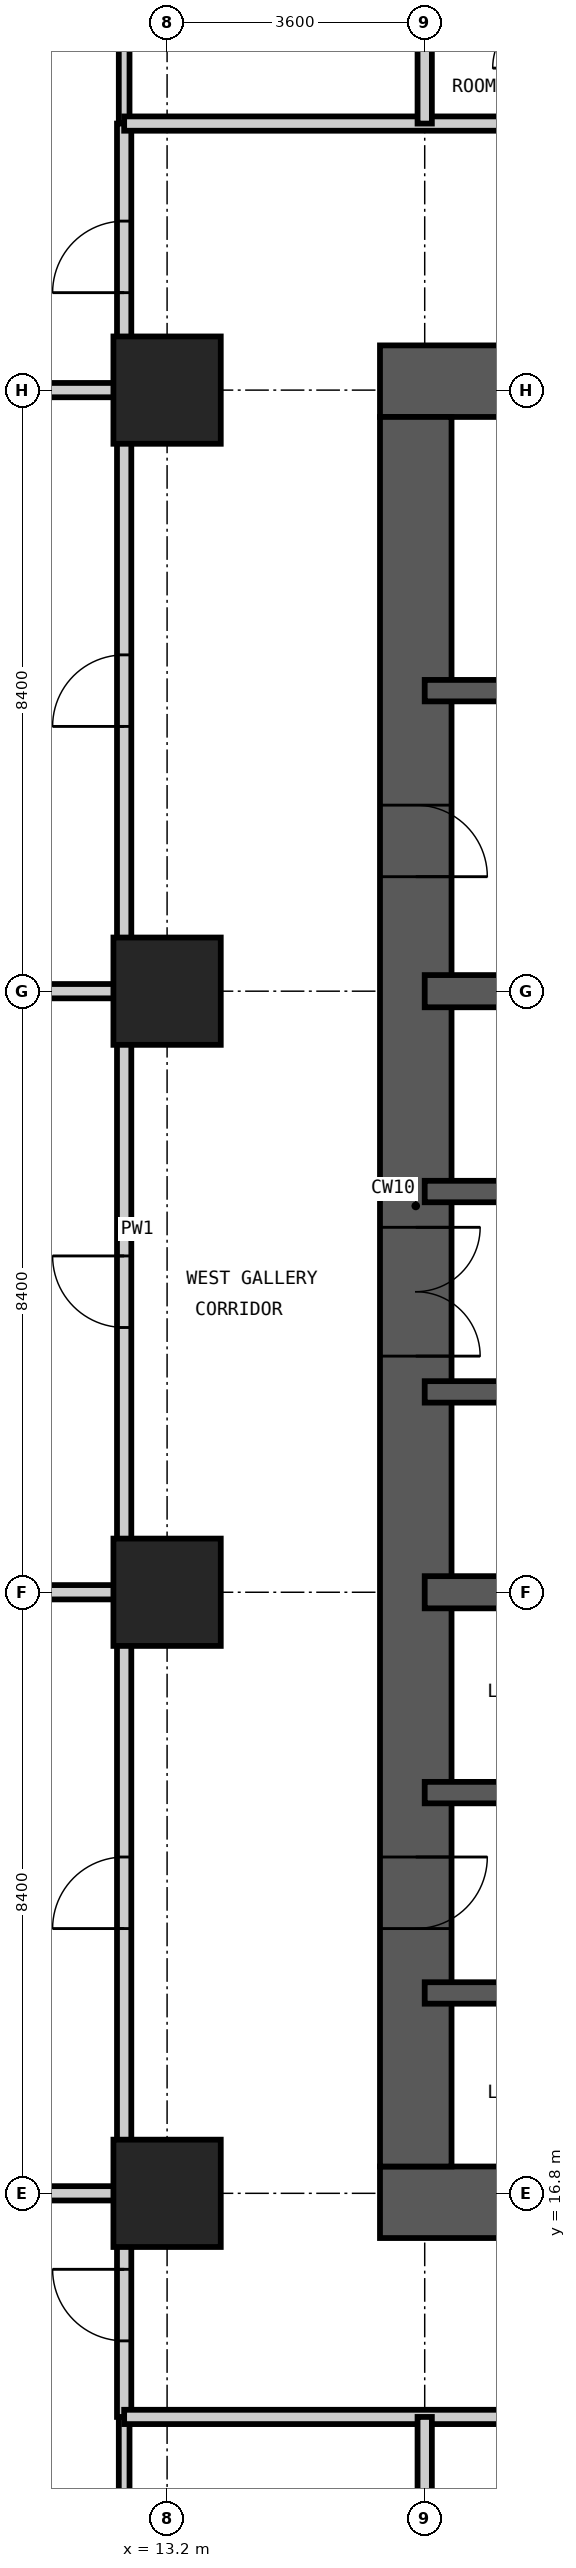
"""IFC4 building model, lengths in metres.
Left out: names, types, materials, properties, quantities, classifications, styles, units other than length and angle.
Written with IfcOpenShell. Run it as: python <this file> out.ifc"""

import sys

from ifc_helpers import new_model, si_unit, direction, frame, frame_2d, origin, origin_2d, place, context, subcontext, project, spatial, rectangle, extrude, element, fill, save


model = new_model("IFC4")
c1 = context("Model", 3, precision=1e-05, world=origin(), true_north=direction((0.0, 1.0)))
c2 = subcontext(c1, "Body", "Model", "MODEL_VIEW")
j1 = project(units=[si_unit("LENGTHUNIT", "METRE"), si_unit("PLANEANGLEUNIT", "RADIAN")], contexts=[c1])
p1 = place(None, origin())
s1 = spatial("IfcSite", under=j1, at=p1, CompositionType="ELEMENT")
p2 = place(p1, origin())
s2 = spatial("IfcBuilding", under=s1, at=p2, CompositionType="ELEMENT")
p3 = place(p2, frame((0.0, 0.0, 122.4)))
s3 = spatial("IfcBuildingStorey", under=s2, at=p3, CompositionType="ELEMENT", Elevation=122.4)
for number, where, z_axis, x_axis in (
    (1, (13.2, 16.8, -0.35), (0.0, 0.0, 1.0), (1.0, 0.0, 0.0)),
    (2, (13.2, 25.2, -0.35), (0.0, 0.0, 1.0), (1.0, 0.0, 0.0)),
    (3, (13.2, 33.6, -0.35), (0.0, 0.0, 1.0), (1.0, 0.0, 0.0)),
    (4, (13.2, 42.0, -0.35), (0.0, 0.0, 1.0), (1.0, 0.0, 0.0)),
):
    element("IfcColumn", number, at=place(p3, frame(where, z_axis=z_axis, x_axis=x_axis)), inside=s3, PredefinedType="COLUMN", context=c2, shape_type="SweptSolid", body=[
        extrude(rectangle(XDim=1.5, YDim=1.5, at=origin_2d()), origin(), (0.0, 0.0, 1.0), 3.6),
    ])
p4 = place(p3, frame((16.175, 16.675, -0.35), z_axis=(0.0, 0.0, 1.0), x_axis=(1.0, 0.0, 0.0)))
e5 = element("IfcWall", 5, at=p4, inside=s3, PredefinedType="SHEAR", context=c2, shape_type="SweptSolid", body=[
    extrude(rectangle(XDim=26.45, YDim=1.0, at=frame_2d((13.225, 0.0))), origin(), (0.0, 0.0, 1.0), 3.6),
])
p5 = place(p4, frame((12.725, 0.0, 0.35)))
e6 = element("IfcOpeningElement", 6, at=p5, cuts=e5, PredefinedType="OPENING", context=c2, shape_type="SweptSolid", body=[
    extrude(rectangle(XDim=1.0, YDim=2.1, at=frame_2d((0.5, 1.05))), frame((0.0, 0.51, 0.0), z_axis=(0.0, -1.0, 0.0), x_axis=(1.0, 0.0, 0.0)), (0.0, 0.0, 1.0), 1.02),
])
p6 = place(p4, frame((19.025, 0.0, 0.35)))
e7 = element("IfcOpeningElement", 7, at=p6, cuts=e5, PredefinedType="OPENING", context=c2, shape_type="SweptSolid", body=[
    extrude(rectangle(XDim=1.0, YDim=2.1, at=frame_2d((0.5, 1.05))), frame((0.0, 0.51, 0.0), z_axis=(0.0, -1.0, 0.0), x_axis=(1.0, 0.0, 0.0)), (0.0, 0.0, 1.0), 1.02),
])
p7 = place(p3, frame((42.625, 42.125, -0.35), z_axis=(0.0, 0.0, 1.0), x_axis=(-1.0, 0.0, 0.0)))
e8 = element("IfcWall", 8, at=p7, inside=s3, PredefinedType="SHEAR", context=c2, shape_type="SweptSolid", body=[
    extrude(rectangle(XDim=26.45, YDim=1.0, at=frame_2d((13.225, 0.0))), origin(), (0.0, 0.0, 1.0), 3.6),
])
p8 = place(p7, frame((21.125, 0.0, 0.35)))
e9 = element("IfcOpeningElement", 9, at=p8, cuts=e8, PredefinedType="OPENING", context=c2, shape_type="SweptSolid", body=[
    extrude(rectangle(XDim=1.0, YDim=2.1, at=frame_2d((0.5, 1.05))), frame((0.0, 0.51, 0.0), z_axis=(0.0, -1.0, 0.0), x_axis=(1.0, 0.0, 0.0)), (0.0, 0.0, 1.0), 1.02),
])
p9 = place(p7, frame((10.525, 0.0, 0.35)))
e10 = element("IfcOpeningElement", 10, at=p9, cuts=e8, PredefinedType="OPENING", context=c2, shape_type="SweptSolid", body=[
    extrude(rectangle(XDim=1.2, YDim=2.2, at=frame_2d((0.6, 1.1))), frame((0.0, 0.51, 0.0), z_axis=(0.0, -1.0, 0.0), x_axis=(1.0, 0.0, 0.0)), (0.0, 0.0, 1.0), 1.02),
])
p10 = place(p3, frame((16.675, 41.625, -0.35), z_axis=(0.0, 0.0, 1.0), x_axis=(0.0, -1.0, 0.0)))
e11 = element("IfcWall", 11, at=p10, inside=s3, PredefinedType="SHEAR", context=c2, shape_type="SweptSolid", body=[
    extrude(rectangle(XDim=24.45, YDim=1.0, at=frame_2d((12.225, 0.0))), origin(), (0.0, 0.0, 1.0), 3.6),
])
p11 = place(p10, frame((11.325, 0.0, 0.35)))
e12 = element("IfcOpeningElement", 12, at=p11, cuts=e11, PredefinedType="OPENING", context=c2, shape_type="SweptSolid", body=[
    extrude(rectangle(XDim=1.8, YDim=2.2, at=frame_2d((0.9, 1.1))), frame((0.0, 0.51, 0.0), z_axis=(0.0, -1.0, 0.0), x_axis=(1.0, 0.0, 0.0)), (0.0, 0.0, 1.0), 1.02),
])
p12 = place(p10, frame((20.125, 0.0, 0.35)))
e13 = element("IfcOpeningElement", 13, at=p12, cuts=e11, PredefinedType="OPENING", context=c2, shape_type="SweptSolid", body=[
    extrude(rectangle(XDim=1.0, YDim=2.1, at=frame_2d((0.5, 1.05))), frame((0.0, 0.51, 0.0), z_axis=(0.0, -1.0, 0.0), x_axis=(1.0, 0.0, 0.0)), (0.0, 0.0, 1.0), 1.02),
])
p13 = place(p10, frame((5.425, 0.0, 0.35)))
e14 = element("IfcOpeningElement", 14, at=p13, cuts=e11, PredefinedType="OPENING", context=c2, shape_type="SweptSolid", body=[
    extrude(rectangle(XDim=1.0, YDim=2.1, at=frame_2d((0.5, 1.05))), frame((0.0, 0.51, 0.0), z_axis=(0.0, -1.0, 0.0), x_axis=(1.0, 0.0, 0.0)), (0.0, 0.0, 1.0), 1.02),
])
for number, where, z_axis, x_axis in (
    (15, (16.8, 19.6, -0.35), (0.0, 0.0, 1.0), (1.0, 0.0, 0.0)),
    (16, (16.8, 22.4, -0.35), (0.0, 0.0, 1.0), (1.0, 0.0, 0.0)),
):
    element("IfcWall", number, at=place(p3, frame(where, z_axis=z_axis, x_axis=x_axis)), inside=s3, PredefinedType="SHEAR", context=c2, shape_type="SweptSolid", body=[
        extrude(rectangle(XDim=8.4, YDim=0.3, at=frame_2d((4.2, 0.0))), origin(), (0.0, 0.0, 1.0), 3.6),
    ])
p14 = place(p3, frame((16.8, 28.0, -0.35), z_axis=(0.0, 0.0, 1.0), x_axis=(1.0, 0.0, 0.0)))
e17 = element("IfcWall", 17, at=p14, inside=s3, PredefinedType="SHEAR", context=c2, shape_type="SweptSolid", body=[
    extrude(rectangle(XDim=8.4, YDim=0.3, at=frame_2d((4.2, 0.0))), origin(), (0.0, 0.0, 1.0), 3.6),
])
p15 = place(p14, frame((1.55, 0.0, 0.35)))
e18 = element("IfcOpeningElement", 18, at=p15, cuts=e17, PredefinedType="OPENING", context=c2, shape_type="SweptSolid", body=[
    extrude(rectangle(XDim=1.1, YDim=2.2, at=frame_2d((0.55, 1.1))), frame((0.0, 0.16, 0.0), z_axis=(0.0, -1.0, 0.0), x_axis=(1.0, 0.0, 0.0)), (0.0, 0.0, 1.0), 0.32),
])
p16 = place(p14, frame((5.75, 0.0, 0.35)))
e19 = element("IfcOpeningElement", 19, at=p16, cuts=e17, PredefinedType="OPENING", context=c2, shape_type="SweptSolid", body=[
    extrude(rectangle(XDim=1.1, YDim=2.2, at=frame_2d((0.55, 1.1))), frame((0.0, 0.16, 0.0), z_axis=(0.0, -1.0, 0.0), x_axis=(1.0, 0.0, 0.0)), (0.0, 0.0, 1.0), 0.32),
])
p17 = place(p3, frame((16.8, 30.8, -0.35), z_axis=(0.0, 0.0, 1.0), x_axis=(1.0, 0.0, 0.0)))
e20 = element("IfcWall", 20, at=p17, inside=s3, PredefinedType="SHEAR", context=c2, shape_type="SweptSolid", body=[
    extrude(rectangle(XDim=8.4, YDim=0.3, at=frame_2d((4.2, 0.0))), origin(), (0.0, 0.0, 1.0), 3.6),
])
p18 = place(p17, frame((1.55, 0.0, 0.35)))
e21 = element("IfcOpeningElement", 21, at=p18, cuts=e20, PredefinedType="OPENING", context=c2, shape_type="SweptSolid", body=[
    extrude(rectangle(XDim=1.1, YDim=2.2, at=frame_2d((0.55, 1.1))), frame((0.0, 0.16, 0.0), z_axis=(0.0, -1.0, 0.0), x_axis=(1.0, 0.0, 0.0)), (0.0, 0.0, 1.0), 0.32),
])
p19 = place(p17, frame((5.75, 0.0, 0.35)))
e22 = element("IfcOpeningElement", 22, at=p19, cuts=e20, PredefinedType="OPENING", context=c2, shape_type="SweptSolid", body=[
    extrude(rectangle(XDim=1.1, YDim=2.2, at=frame_2d((0.55, 1.1))), frame((0.0, 0.16, 0.0), z_axis=(0.0, -1.0, 0.0), x_axis=(1.0, 0.0, 0.0)), (0.0, 0.0, 1.0), 0.32),
])
p20 = place(p3, frame((16.8, 37.8, -0.35), z_axis=(0.0, 0.0, 1.0), x_axis=(1.0, 0.0, 0.0)))
e23 = element("IfcWall", 23, at=p20, inside=s3, PredefinedType="SHEAR", context=c2, shape_type="SweptSolid", body=[
    extrude(rectangle(XDim=8.4, YDim=0.3, at=frame_2d((4.2, 0.0))), origin(), (0.0, 0.0, 1.0), 3.6),
])
p21 = place(p3, frame((16.8, 25.2, -0.35), z_axis=(0.0, 0.0, 1.0), x_axis=(1.0, 0.0, 0.0)))
e24 = element("IfcWall", 24, at=p21, inside=s3, PredefinedType="SHEAR", context=c2, shape_type="SweptSolid", body=[
    extrude(rectangle(XDim=25.2, YDim=0.45, at=frame_2d((12.6, 0.0))), origin(), (0.0, 0.0, 1.0), 3.6),
])
p22 = place(p3, frame((16.8, 33.6, -0.35), z_axis=(0.0, 0.0, 1.0), x_axis=(1.0, 0.0, 0.0)))
e25 = element("IfcWall", 25, at=p22, inside=s3, PredefinedType="SHEAR", context=c2, shape_type="SweptSolid", body=[
    extrude(rectangle(XDim=25.2, YDim=0.45, at=frame_2d((12.6, 0.0))), origin(), (0.0, 0.0, 1.0), 3.6),
])
p23 = place(p22, frame((23.3, 0.0, 0.35)))
e26 = element("IfcOpeningElement", 26, at=p23, cuts=e25, PredefinedType="OPENING", context=c2, shape_type="SweptSolid", body=[
    extrude(rectangle(XDim=1.0, YDim=2.1, at=frame_2d((0.5, 1.05))), frame((0.0, 0.235, 0.0), z_axis=(0.0, -1.0, 0.0), x_axis=(1.0, 0.0, 0.0)), (0.0, 0.0, 1.0), 0.47),
])
for number, where, z_axis, x_axis in (
    (27, (12.6, 10.675, 0.0), (0.0, 0.0, 1.0), (0.0, 1.0, 0.0)),
    (28, (12.6, 45.725, 0.0), (0.0, 0.0, 1.0), (0.0, 1.0, 0.0)),
):
    element("IfcWall", number, at=place(p3, frame(where, z_axis=z_axis, x_axis=x_axis)), inside=s3, PredefinedType="PARTITIONING", context=c2, shape_type="SweptSolid", body=[
        extrude(rectangle(XDim=3.0, YDim=0.15, at=frame_2d((1.5, 0.0))), origin(), (0.0, 0.0, 1.0), 3.25),
    ])
p24 = place(p3, frame((12.6, 13.675, 0.0), z_axis=(0.0, 0.0, 1.0), x_axis=(0.0, 1.0, 0.0)))
e29 = element("IfcWall", 29, at=p24, inside=s3, PredefinedType="PARTITIONING", context=c2, shape_type="SweptSolid", body=[
    extrude(rectangle(XDim=32.05, YDim=0.2, at=frame_2d((16.025, 0.0))), origin(), (0.0, 0.0, 1.0), 3.25),
])
p25 = place(p24, frame((6.825, 0.0, 0.0)))
e30 = element("IfcOpeningElement", 30, at=p25, cuts=e29, PredefinedType="OPENING", context=c2, shape_type="SweptSolid", body=[
    extrude(rectangle(XDim=1.0, YDim=2.2, at=frame_2d((0.5, 1.1))), frame((0.0, 0.11, 0.0), z_axis=(0.0, -1.0, 0.0), x_axis=(1.0, 0.0, 0.0)), (0.0, 0.0, 1.0), 0.22),
])
p26 = place(p24, frame((15.225, 0.0, 0.0)))
e31 = element("IfcOpeningElement", 31, at=p26, cuts=e29, PredefinedType="OPENING", context=c2, shape_type="SweptSolid", body=[
    extrude(rectangle(XDim=1.0, YDim=2.2, at=frame_2d((0.5, 1.1))), frame((0.0, 0.11, 0.0), z_axis=(0.0, -1.0, 0.0), x_axis=(1.0, 0.0, 0.0)), (0.0, 0.0, 1.0), 0.22),
])
p27 = place(p24, frame((23.625, 0.0, 0.0)))
e32 = element("IfcOpeningElement", 32, at=p27, cuts=e29, PredefinedType="OPENING", context=c2, shape_type="SweptSolid", body=[
    extrude(rectangle(XDim=1.0, YDim=2.2, at=frame_2d((0.5, 1.1))), frame((0.0, 0.11, 0.0), z_axis=(0.0, -1.0, 0.0), x_axis=(1.0, 0.0, 0.0)), (0.0, 0.0, 1.0), 0.22),
])
p28 = place(p24, frame((1.063, 0.0, 0.0)))
e33 = element("IfcOpeningElement", 33, at=p28, cuts=e29, PredefinedType="OPENING", context=c2, shape_type="SweptSolid", body=[
    extrude(rectangle(XDim=1.0, YDim=2.2, at=frame_2d((0.5, 1.1))), frame((0.0, 0.11, 0.0), z_axis=(0.0, -1.0, 0.0), x_axis=(1.0, 0.0, 0.0)), (0.0, 0.0, 1.0), 0.22),
])
p29 = place(p24, frame((29.687, 0.0, 0.0)))
e34 = element("IfcOpeningElement", 34, at=p29, cuts=e29, PredefinedType="OPENING", context=c2, shape_type="SweptSolid", body=[
    extrude(rectangle(XDim=1.0, YDim=2.2, at=frame_2d((0.5, 1.1))), frame((0.0, 0.11, 0.0), z_axis=(0.0, -1.0, 0.0), x_axis=(1.0, 0.0, 0.0)), (0.0, 0.0, 1.0), 0.22),
])
p30 = place(p3, frame((12.6, 45.725, 0.0), z_axis=(0.0, 0.0, 1.0), x_axis=(1.0, 0.0, 0.0)))
e35 = element("IfcWall", 35, at=p30, inside=s3, PredefinedType="PARTITIONING", context=c2, shape_type="SweptSolid", body=[
    extrude(rectangle(XDim=31.925, YDim=0.2, at=frame_2d((15.962, 0.0))), origin(), (0.0, 0.0, 1.0), 3.25),
])
p31 = place(p30, frame((6.7, 0.0, 0.0)))
e36 = element("IfcOpeningElement", 36, at=p31, cuts=e35, PredefinedType="OPENING", context=c2, shape_type="SweptSolid", body=[
    extrude(rectangle(XDim=1.0, YDim=2.2, at=frame_2d((0.5, 1.1))), frame((0.0, 0.11, 0.0), z_axis=(0.0, -1.0, 0.0), x_axis=(1.0, 0.0, 0.0)), (0.0, 0.0, 1.0), 0.22),
])
p32 = place(p30, frame((17.5, 0.0, 0.0)))
e37 = element("IfcOpeningElement", 37, at=p32, cuts=e35, PredefinedType="OPENING", context=c2, shape_type="SweptSolid", body=[
    extrude(rectangle(XDim=1.0, YDim=2.2, at=frame_2d((0.5, 1.1))), frame((0.0, 0.11, 0.0), z_axis=(0.0, -1.0, 0.0), x_axis=(1.0, 0.0, 0.0)), (0.0, 0.0, 1.0), 0.22),
])
p33 = place(p30, frame((23.5, 0.0, 0.0)))
e38 = element("IfcOpeningElement", 38, at=p33, cuts=e35, PredefinedType="OPENING", context=c2, shape_type="SweptSolid", body=[
    extrude(rectangle(XDim=1.0, YDim=2.2, at=frame_2d((0.5, 1.1))), frame((0.0, 0.11, 0.0), z_axis=(0.0, -1.0, 0.0), x_axis=(1.0, 0.0, 0.0)), (0.0, 0.0, 1.0), 0.22),
])
p34 = place(p3, frame((44.525, 13.675, 0.0), z_axis=(0.0, 0.0, 1.0), x_axis=(-1.0, 0.0, 0.0)))
e39 = element("IfcWall", 39, at=p34, inside=s3, PredefinedType="PARTITIONING", context=c2, shape_type="SweptSolid", body=[
    extrude(rectangle(XDim=31.925, YDim=0.2, at=frame_2d((15.962, 0.0))), origin(), (0.0, 0.0, 1.0), 3.25),
])
p35 = place(p34, frame((25.125, 0.0, 0.0)))
e40 = element("IfcOpeningElement", 40, at=p35, cuts=e39, PredefinedType="OPENING", context=c2, shape_type="SweptSolid", body=[
    extrude(rectangle(XDim=1.0, YDim=2.2, at=frame_2d((0.5, 1.1))), frame((0.0, 0.11, 0.0), z_axis=(0.0, -1.0, 0.0), x_axis=(1.0, 0.0, 0.0)), (0.0, 0.0, 1.0), 0.22),
])
p36 = place(p34, frame((18.825, 0.0, 0.0)))
e41 = element("IfcOpeningElement", 41, at=p36, cuts=e39, PredefinedType="OPENING", context=c2, shape_type="SweptSolid", body=[
    extrude(rectangle(XDim=1.0, YDim=2.2, at=frame_2d((0.5, 1.1))), frame((0.0, 0.11, 0.0), z_axis=(0.0, -1.0, 0.0), x_axis=(1.0, 0.0, 0.0)), (0.0, 0.0, 1.0), 0.22),
])
p37 = place(p34, frame((10.425, 0.0, 0.0)))
e42 = element("IfcOpeningElement", 42, at=p37, cuts=e39, PredefinedType="OPENING", context=c2, shape_type="SweptSolid", body=[
    extrude(rectangle(XDim=1.0, YDim=2.2, at=frame_2d((0.5, 1.1))), frame((0.0, 0.11, 0.0), z_axis=(0.0, -1.0, 0.0), x_axis=(1.0, 0.0, 0.0)), (0.0, 0.0, 1.0), 0.22),
])
p38 = place(p34, frame((4.125, 0.0, 0.0)))
e43 = element("IfcOpeningElement", 43, at=p38, cuts=e39, PredefinedType="OPENING", context=c2, shape_type="SweptSolid", body=[
    extrude(rectangle(XDim=1.0, YDim=2.2, at=frame_2d((0.5, 1.1))), frame((0.0, 0.11, 0.0), z_axis=(0.0, -1.0, 0.0), x_axis=(1.0, 0.0, 0.0)), (0.0, 0.0, 1.0), 0.22),
])
p39 = place(p3, frame((16.8, -0.018, 0.0), z_axis=(0.0, 0.0, 1.0), x_axis=(0.0, 1.0, 0.0)))
e44 = element("IfcWall", 44, at=p39, inside=s3, PredefinedType="PARTITIONING", context=c2, shape_type="SweptSolid", body=[
    extrude(rectangle(XDim=13.693, YDim=0.2, at=frame_2d((6.847, 0.0))), origin(), (0.0, 0.0, 1.0), 3.25),
])
p40 = place(p3, frame((16.8, 45.725, 0.0), z_axis=(0.0, 0.0, 1.0), x_axis=(0.0, 1.0, 0.0)))
e45 = element("IfcWall", 45, at=p40, inside=s3, PredefinedType="PARTITIONING", context=c2, shape_type="SweptSolid", body=[
    extrude(rectangle(XDim=8.893, YDim=0.2, at=frame_2d((4.446, 0.0))), origin(), (0.0, 0.0, 1.0), 3.25),
])
for number, where, z_axis, x_axis in (
    (46, (-0.018, 16.8, 0.0), (0.0, 0.0, 1.0), (1.0, 0.0, 0.0)),
    (47, (-0.018, 25.2, 0.0), (0.0, 0.0, 1.0), (1.0, 0.0, 0.0)),
    (48, (-0.018, 33.6, 0.0), (0.0, 0.0, 1.0), (1.0, 0.0, 0.0)),
    (49, (-0.018, 42.0, 0.0), (0.0, 0.0, 1.0), (1.0, 0.0, 0.0)),
):
    element("IfcWall", number, at=place(p3, frame(where, z_axis=z_axis, x_axis=x_axis)), inside=s3, PredefinedType="PARTITIONING", context=c2, shape_type="SweptSolid", body=[
        extrude(rectangle(XDim=12.618, YDim=0.2, at=frame_2d((6.309, 0.0))), origin(), (0.0, 0.0, 1.0), 3.25),
    ])
p41 = place(p25, origin())
e50 = element("IfcDoor", 50, at=p41, inside=s3, OperationType="SINGLE_SWING_LEFT", PredefinedType="DOOR", context=c2, shape_type="SweptSolid", body=[
    extrude(rectangle(XDim=1.0, YDim=2.2, at=frame_2d((0.5, 1.1))), frame((0.0, 0.025, 0.0), z_axis=(0.0, -1.0, 0.0), x_axis=(1.0, 0.0, 0.0)), (0.0, 0.0, 1.0), 0.05),
])
fill(e30, e50)
p42 = place(p26, origin())
e51 = element("IfcDoor", 51, at=p42, inside=s3, OperationType="SINGLE_SWING_RIGHT", PredefinedType="DOOR", context=c2, shape_type="SweptSolid", body=[
    extrude(rectangle(XDim=1.0, YDim=2.2, at=frame_2d((0.5, 1.1))), frame((0.0, 0.025, 0.0), z_axis=(0.0, -1.0, 0.0), x_axis=(1.0, 0.0, 0.0)), (0.0, 0.0, 1.0), 0.05),
])
fill(e31, e51)
p43 = place(p27, origin())
e52 = element("IfcDoor", 52, at=p43, inside=s3, OperationType="SINGLE_SWING_LEFT", PredefinedType="DOOR", context=c2, shape_type="SweptSolid", body=[
    extrude(rectangle(XDim=1.0, YDim=2.2, at=frame_2d((0.5, 1.1))), frame((0.0, 0.025, 0.0), z_axis=(0.0, -1.0, 0.0), x_axis=(1.0, 0.0, 0.0)), (0.0, 0.0, 1.0), 0.05),
])
fill(e32, e52)
p44 = place(p28, origin())
e53 = element("IfcDoor", 53, at=p44, inside=s3, OperationType="SINGLE_SWING_RIGHT", PredefinedType="DOOR", context=c2, shape_type="SweptSolid", body=[
    extrude(rectangle(XDim=1.0, YDim=2.2, at=frame_2d((0.5, 1.1))), frame((0.0, 0.025, 0.0), z_axis=(0.0, -1.0, 0.0), x_axis=(1.0, 0.0, 0.0)), (0.0, 0.0, 1.0), 0.05),
])
fill(e33, e53)
p45 = place(p29, origin())
e54 = element("IfcDoor", 54, at=p45, inside=s3, OperationType="SINGLE_SWING_LEFT", PredefinedType="DOOR", context=c2, shape_type="SweptSolid", body=[
    extrude(rectangle(XDim=1.0, YDim=2.2, at=frame_2d((0.5, 1.1))), frame((0.0, 0.025, 0.0), z_axis=(0.0, -1.0, 0.0), x_axis=(1.0, 0.0, 0.0)), (0.0, 0.0, 1.0), 0.05),
])
fill(e34, e54)
p46 = place(p11, origin())
e55 = element("IfcDoor", 55, at=p46, inside=s3, OperationType="DOUBLE_DOOR_DOUBLE_SWING", PredefinedType="DOOR", context=c2, shape_type="SweptSolid", body=[
    extrude(rectangle(XDim=1.8, YDim=2.2, at=frame_2d((0.9, 1.1))), frame((0.0, 0.025, 0.0), z_axis=(0.0, -1.0, 0.0), x_axis=(1.0, 0.0, 0.0)), (0.0, 0.0, 1.0), 0.05),
])
fill(e12, e55)
p47 = place(p12, origin())
e56 = element("IfcDoor", 56, at=p47, inside=s3, OperationType="SINGLE_SWING_LEFT", PredefinedType="DOOR", context=c2, shape_type="SweptSolid", body=[
    extrude(rectangle(XDim=1.0, YDim=2.1, at=frame_2d((0.5, 1.05))), frame((0.0, 0.025, 0.0), z_axis=(0.0, -1.0, 0.0), x_axis=(1.0, 0.0, 0.0)), (0.0, 0.0, 1.0), 0.05),
])
fill(e13, e56)
p48 = place(p13, origin())
e57 = element("IfcDoor", 57, at=p48, inside=s3, OperationType="SINGLE_SWING_RIGHT", PredefinedType="DOOR", context=c2, shape_type="SweptSolid", body=[
    extrude(rectangle(XDim=1.0, YDim=2.1, at=frame_2d((0.5, 1.05))), frame((0.0, 0.025, 0.0), z_axis=(0.0, -1.0, 0.0), x_axis=(1.0, 0.0, 0.0)), (0.0, 0.0, 1.0), 0.05),
])
fill(e14, e57)
save(model, sys.argv[1])
